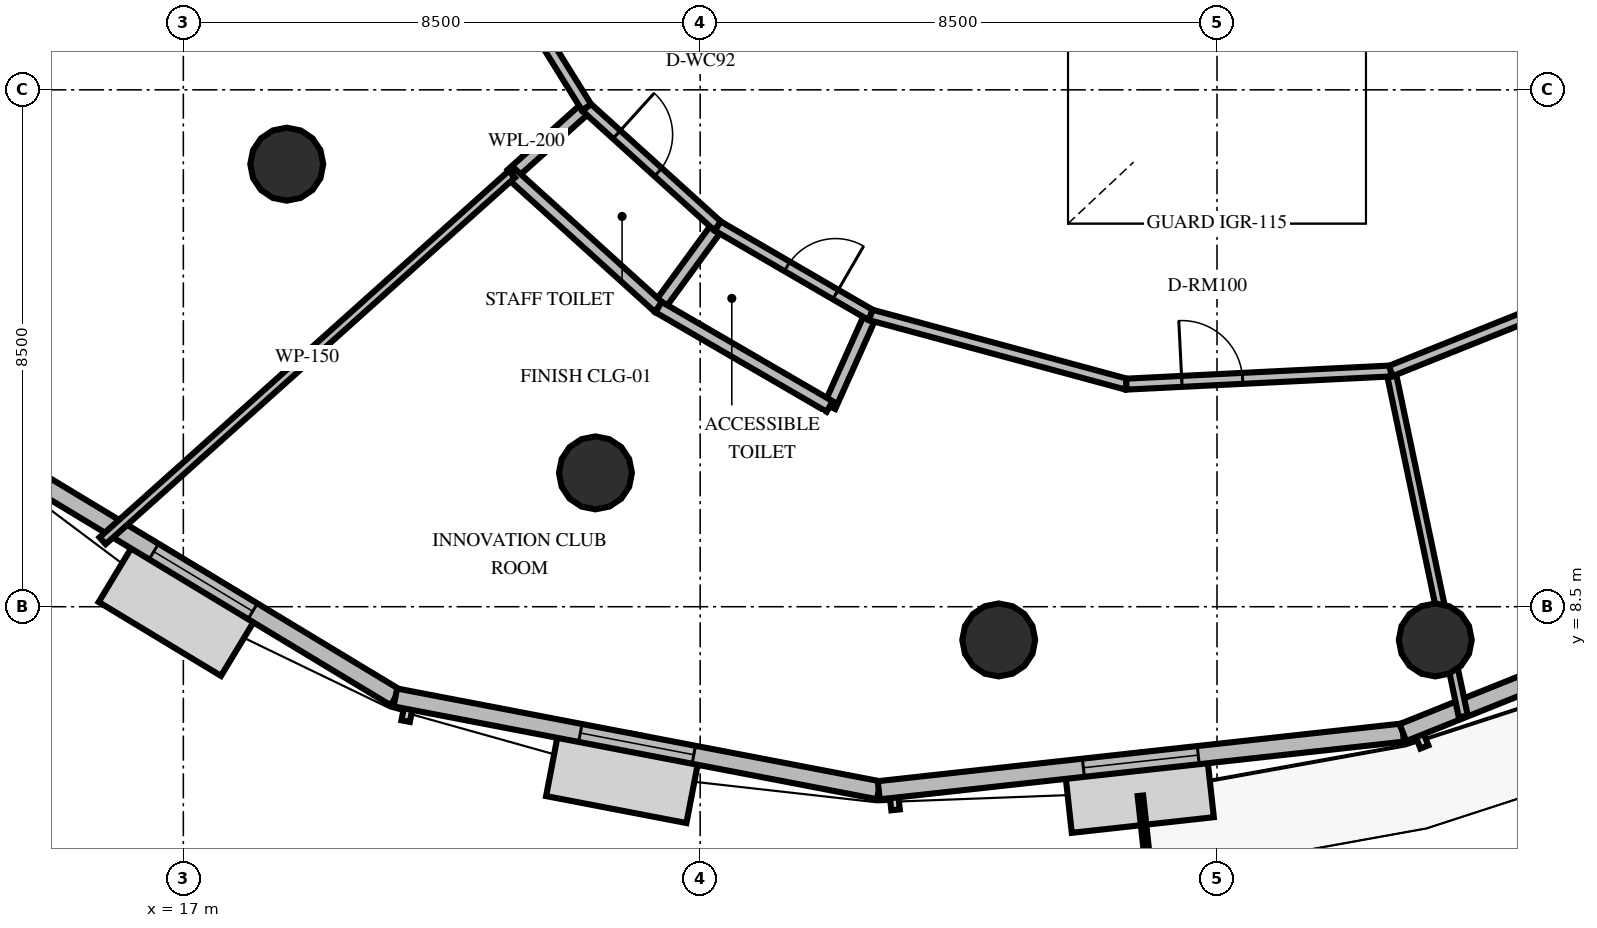
"""IFC4 building model, lengths in metres.
Left out: names, types, materials, properties, quantities, classifications, styles, units other than length and angle.
Written with IfcOpenShell. Run it as: python <this file> out.ifc"""

import sys

from ifc_helpers import new_model, si_unit, direction, frame, frame_2d, origin, origin_2d, place, context, subcontext, project, spatial, rectangle, circle, extrude, element, fill, save


model = new_model("IFC4")
c1 = context("Model", 3, precision=1e-05, world=origin(), true_north=direction((0.0, 1.0)))
c2 = subcontext(c1, "Body", "Model", "MODEL_VIEW")
j1 = project(units=[si_unit("LENGTHUNIT", "METRE"), si_unit("PLANEANGLEUNIT", "RADIAN")], contexts=[c1])
p1 = place(None, origin())
s1 = spatial("IfcSite", under=j1, at=p1, CompositionType="ELEMENT")
p2 = place(p1, origin())
s2 = spatial("IfcBuilding", under=s1, at=p2, CompositionType="ELEMENT")
p3 = place(p2, frame((0.0, 0.0, 125.8)))
s3 = spatial("IfcBuildingStorey", under=s2, at=p3, CompositionType="ELEMENT", Elevation=125.8)
for number, where, z_axis, x_axis in (
    (1, (18.701, 15.778, 0.0), (0.0, 0.0, 1.0), (1.0, 0.0, 0.0)),
    (2, (23.778, 10.701, 0.0), (0.0, 0.0, 1.0), (1.0, 0.0, 0.0)),
    (3, (30.41, 7.954, 0.0), (0.0, 0.0, 1.0), (1.0, 0.0, 0.0)),
    (4, (37.59, 7.954, 0.0), (0.0, 0.0, 1.0), (1.0, 0.0, 0.0)),
):
    element("IfcColumn", number, at=place(p3, frame(where, z_axis=z_axis, x_axis=x_axis)), inside=s3, PredefinedType="COLUMN", context=c2, shape_type="SweptSolid", body=[
        extrude(circle(Radius=0.6, at=origin_2d()), origin(), (0.0, 0.0, 1.0), 4.0),
    ])
p4 = place(p3, frame((14.167, 10.825, 0.0), z_axis=(0.0, 0.0, 1.0), x_axis=(0.856004258132, -0.516968770875, 0.0)))
e5 = element("IfcWall", 5, at=p4, inside=s3, PredefinedType="SOLIDWALL", context=c2, shape_type="SweptSolid", body=[
    extrude(rectangle(XDim=7.383, YDim=0.3, at=frame_2d((3.692, 0.0))), origin(), (0.0, 0.0, 1.0), 2.9),
])
p5 = place(p4, frame((2.742, 0.0, 0.8)))
e6 = element("IfcOpeningElement", 6, at=p5, cuts=e5, PredefinedType="OPENING", context=c2, shape_type="SweptSolid", body=[
    extrude(rectangle(XDim=1.9, YDim=1.95, at=frame_2d((0.95, 0.975))), frame((0.0, 0.16, 0.0), z_axis=(0.0, -1.0, 0.0), x_axis=(1.0, 0.0, 0.0)), (0.0, 0.0, 1.0), 0.32),
])
p6 = place(p3, frame((20.487, 7.008, 0.0), z_axis=(0.0, 0.0, 1.0), x_axis=(0.982062977667, -0.188553196461, 0.0)))
e7 = element("IfcWall", 7, at=p6, inside=s3, PredefinedType="SOLIDWALL", context=c2, shape_type="SweptSolid", body=[
    extrude(rectangle(XDim=8.095, YDim=0.3, at=frame_2d((4.048, 0.0))), origin(), (0.0, 0.0, 1.0), 2.9),
])
p7 = place(p6, frame((3.098, 0.0, 0.8)))
e8 = element("IfcOpeningElement", 8, at=p7, cuts=e7, PredefinedType="OPENING", context=c2, shape_type="SweptSolid", body=[
    extrude(rectangle(XDim=1.9, YDim=1.95, at=frame_2d((0.95, 0.975))), frame((0.0, 0.16, 0.0), z_axis=(0.0, -1.0, 0.0), x_axis=(1.0, 0.0, 0.0)), (0.0, 0.0, 1.0), 0.32),
])
p8 = place(p3, frame((28.437, 5.481, 0.0), z_axis=(0.0, 0.0, 1.0), x_axis=(0.99400193871, 0.109362451697, 0.0)))
e9 = element("IfcWall", 9, at=p8, inside=s3, PredefinedType="SOLIDWALL", context=c2, shape_type="SweptSolid", body=[
    extrude(rectangle(XDim=8.673, YDim=0.3, at=frame_2d((4.336, 0.0))), origin(), (0.0, 0.0, 1.0), 2.9),
])
p9 = place(p8, frame((3.386, 0.0, 0.8)))
e10 = element("IfcOpeningElement", 10, at=p9, cuts=e9, PredefinedType="OPENING", context=c2, shape_type="SweptSolid", body=[
    extrude(rectangle(XDim=1.9, YDim=1.95, at=frame_2d((0.95, 0.975))), frame((0.0, 0.16, 0.0), z_axis=(0.0, -1.0, 0.0), x_axis=(1.0, 0.0, 0.0)), (0.0, 0.0, 1.0), 0.32),
])
p10 = place(p3, frame((37.058, 6.43, 0.0), z_axis=(0.0, 0.0, 1.0), x_axis=(0.928154394982, 0.372195404426, 0.0)))
e11 = element("IfcWall", 11, at=p10, inside=s3, PredefinedType="SOLIDWALL", context=c2, shape_type="SweptSolid", body=[
    extrude(rectangle(XDim=8.891, YDim=0.3, at=frame_2d((4.445, 0.0))), origin(), (0.0, 0.0, 1.0), 2.9),
])
p11 = place(p10, frame((4.11, 0.0, 0.0)))
e12 = element("IfcOpeningElement", 12, at=p11, cuts=e11, PredefinedType="OPENING", context=c2, shape_type="SweptSolid", body=[
    extrude(rectangle(XDim=1.05, YDim=2.15, at=frame_2d((0.525, 1.075))), frame((0.0, 0.16, 0.0), z_axis=(0.0, -1.0, 0.0), x_axis=(1.0, 0.0, 0.0)), (0.0, 0.0, 1.0), 0.32),
])
p12 = place(p3, frame((23.631, 16.713, 0.0), z_axis=(0.0, 0.0, 1.0), x_axis=(-0.744881296244, -0.667197013262, 0.0)))
e13 = element("IfcWall", 13, at=p12, inside=s3, PredefinedType="PLUMBINGWALL", context=c2, shape_type="SweptSolid", body=[
    extrude(rectangle(XDim=1.65, YDim=0.2, at=frame_2d((0.825, 0.0))), origin(), (0.0, 0.0, 1.0), 2.8),
])
p13 = place(p3, frame((25.789, 14.76, 0.0), z_axis=(0.0, 0.0, 1.0), x_axis=(-0.58986820349, -0.807499537158, 0.0)))
e14 = element("IfcWall", 14, at=p13, inside=s3, PredefinedType="PLUMBINGWALL", context=c2, shape_type="SweptSolid", body=[
    extrude(rectangle(XDim=1.65, YDim=0.2, at=frame_2d((0.825, 0.0))), origin(), (0.0, 0.0, 1.0), 2.8),
])
p14 = place(p3, frame((22.402, 15.612, 0.0), z_axis=(0.0, 0.0, 1.0), x_axis=(0.741336734145, -0.671133255477, 0.0)))
e15 = element("IfcWall", 15, at=p14, inside=s3, PredefinedType="PLUMBINGWALL", context=c2, shape_type="SweptSolid", body=[
    extrude(rectangle(XDim=3.255, YDim=0.2, at=frame_2d((1.627, 0.0))), origin(), (0.0, 0.0, 1.0), 2.8),
])
p15 = place(p3, frame((23.631, 16.713, 0.0), z_axis=(0.0, 0.0, 1.0), x_axis=(0.741384706551, -0.671080261141, 0.0)))
e16 = element("IfcWall", 16, at=p15, inside=s3, PredefinedType="PARTITIONING", context=c2, shape_type="SweptSolid", body=[
    extrude(rectangle(XDim=2.91, YDim=0.18, at=frame_2d((1.455, 0.0))), origin(), (0.0, 0.0, 1.0), 2.8),
])
p16 = place(p15, frame((0.669, 0.0, 0.0)))
e17 = element("IfcOpeningElement", 17, at=p16, cuts=e16, PredefinedType="OPENING", context=c2, shape_type="SweptSolid", body=[
    extrude(rectangle(XDim=0.92, YDim=2.1, at=frame_2d((0.46, 1.05))), frame((0.0, 0.1, 0.0), z_axis=(0.0, -1.0, 0.0), x_axis=(1.0, 0.0, 0.0)), (0.0, 0.0, 1.0), 0.2),
])
p17 = place(p3, frame((28.305, 13.298, 0.0), z_axis=(0.0, 0.0, 1.0), x_axis=(-0.409115381084, -0.912482660088, 0.0)))
e18 = element("IfcWall", 18, at=p17, inside=s3, PredefinedType="PLUMBINGWALL", context=c2, shape_type="SweptSolid", body=[
    extrude(rectangle(XDim=1.65, YDim=0.2, at=frame_2d((0.825, 0.0))), origin(), (0.0, 0.0, 1.0), 2.8),
])
p18 = place(p3, frame((24.815, 13.427, 0.0), z_axis=(0.0, 0.0, 1.0), x_axis=(0.864732205819, -0.502233224925, 0.0)))
e19 = element("IfcWall", 19, at=p18, inside=s3, PredefinedType="PLUMBINGWALL", context=c2, shape_type="SweptSolid", body=[
    extrude(rectangle(XDim=3.255, YDim=0.2, at=frame_2d((1.627, 0.0))), origin(), (0.0, 0.0, 1.0), 2.8),
])
p19 = place(p3, frame((25.789, 14.76, 0.0), z_axis=(0.0, 0.0, 1.0), x_axis=(0.864705496713, -0.502279209161, 0.0)))
e20 = element("IfcWall", 20, at=p19, inside=s3, PredefinedType="PARTITIONING", context=c2, shape_type="SweptSolid", body=[
    extrude(rectangle(XDim=2.91, YDim=0.18, at=frame_2d((1.455, 0.0))), origin(), (0.0, 0.0, 1.0), 2.8),
])
p20 = place(p19, frame((1.321, 0.0, 0.0)))
e21 = element("IfcOpeningElement", 21, at=p20, cuts=e20, PredefinedType="OPENING", context=c2, shape_type="SweptSolid", body=[
    extrude(rectangle(XDim=0.92, YDim=2.1, at=frame_2d((0.46, 1.05))), frame((0.0, 0.1, 0.0), z_axis=(0.0, -1.0, 0.0), x_axis=(1.0, 0.0, 0.0)), (0.0, 0.0, 1.0), 0.2),
])
p21 = place(p3, frame((22.402, 15.612, 0.0), z_axis=(0.0, 0.0, 1.0), x_axis=(-0.744885698321, -0.667192098602, 0.0)))
e22 = element("IfcWall", 22, at=p21, inside=s3, PredefinedType="PARTITIONING", context=c2, shape_type="SweptSolid", body=[
    extrude(rectangle(XDim=9.034, YDim=0.15, at=frame_2d((4.517, 0.0))), origin(), (0.0, 0.0, 1.0), 2.8),
])
p22 = place(p3, frame((36.858, 12.377, 0.0), z_axis=(0.0, 0.0, 1.0), x_axis=(0.205378628845, -0.978682593497, 0.0)))
e23 = element("IfcWall", 23, at=p22, inside=s3, PredefinedType="PARTITIONING", context=c2, shape_type="SweptSolid", body=[
    extrude(rectangle(XDim=5.803, YDim=0.15, at=frame_2d((2.902, 0.0))), origin(), (0.0, 0.0, 1.0), 2.8),
])
p23 = place(p3, frame((28.305, 13.298, 0.0), z_axis=(0.0, 0.0, 1.0), x_axis=(0.965247291072, -0.261338223531, 0.0)))
e24 = element("IfcWall", 24, at=p23, inside=s3, PredefinedType="PARTITIONING", context=c2, shape_type="SweptSolid", body=[
    extrude(rectangle(XDim=4.355, YDim=0.18, at=frame_2d((2.178, 0.0))), origin(), (0.0, 0.0, 1.0), 2.8),
])
p24 = place(p3, frame((32.509, 12.16, 0.0), z_axis=(0.0, 0.0, 1.0), x_axis=(0.998762941089, 0.049725119485, 0.0)))
e25 = element("IfcWall", 25, at=p24, inside=s3, PredefinedType="PARTITIONING", context=c2, shape_type="SweptSolid", body=[
    extrude(rectangle(XDim=4.355, YDim=0.18, at=frame_2d((2.177, 0.0))), origin(), (0.0, 0.0, 1.0), 2.8),
])
p25 = place(p24, frame((0.914, 0.0, 0.0)))
e26 = element("IfcOpeningElement", 26, at=p25, cuts=e25, PredefinedType="OPENING", context=c2, shape_type="SweptSolid", body=[
    extrude(rectangle(XDim=1.0, YDim=2.15, at=frame_2d((0.5, 1.075))), frame((0.0, 0.1, 0.0), z_axis=(0.0, -1.0, 0.0), x_axis=(1.0, 0.0, 0.0)), (0.0, 0.0, 1.0), 0.2),
])
p26 = place(p3, frame((36.858, 12.377, 0.0), z_axis=(0.0, 0.0, 1.0), x_axis=(0.928173370801, 0.372148080387, 0.0)))
e27 = element("IfcWall", 27, at=p26, inside=s3, PredefinedType="PARTITIONING", context=c2, shape_type="SweptSolid", body=[
    extrude(rectangle(XDim=4.834, YDim=0.18, at=frame_2d((2.417, 0.0))), origin(), (0.0, 0.0, 1.0), 2.8),
])
p27 = place(p3, frame((21.08, 20.819, 0.0), z_axis=(0.0, 0.0, 1.0), x_axis=(0.527690930955, -0.849436449293, 0.0)))
e28 = element("IfcWall", 28, at=p27, inside=s3, PredefinedType="PARTITIONING", context=c2, shape_type="SweptSolid", body=[
    extrude(rectangle(XDim=4.834, YDim=0.18, at=frame_2d((2.417, 0.0))), origin(), (0.0, 0.0, 1.0), 2.8),
])
p28 = place(p27, frame((1.034, 0.0, 0.0)))
e29 = element("IfcOpeningElement", 29, at=p28, cuts=e28, PredefinedType="OPENING", context=c2, shape_type="SweptSolid", body=[
    extrude(rectangle(XDim=1.0, YDim=2.15, at=frame_2d((0.5, 1.075))), frame((0.0, 0.1, 0.0), z_axis=(0.0, -1.0, 0.0), x_axis=(1.0, 0.0, 0.0)), (0.0, 0.0, 1.0), 0.2),
])
p29 = place(p5, origin())
e30 = element("IfcWindow", 30, at=p29, inside=s3, PartitioningType="SINGLE_PANEL", PredefinedType="WINDOW", context=c2, shape_type="SweptSolid", body=[
    extrude(rectangle(XDim=1.9, YDim=1.95, at=frame_2d((0.95, 0.975))), frame((0.0, 0.03, 0.0), z_axis=(0.0, -1.0, 0.0), x_axis=(1.0, 0.0, 0.0)), (0.0, 0.0, 1.0), 0.06),
])
fill(e6, e30)
p30 = place(p7, origin())
e31 = element("IfcWindow", 31, at=p30, inside=s3, PartitioningType="SINGLE_PANEL", PredefinedType="WINDOW", context=c2, shape_type="SweptSolid", body=[
    extrude(rectangle(XDim=1.9, YDim=1.95, at=frame_2d((0.95, 0.975))), frame((0.0, 0.03, 0.0), z_axis=(0.0, -1.0, 0.0), x_axis=(1.0, 0.0, 0.0)), (0.0, 0.0, 1.0), 0.06),
])
fill(e8, e31)
p31 = place(p9, origin())
e32 = element("IfcWindow", 32, at=p31, inside=s3, PartitioningType="SINGLE_PANEL", PredefinedType="WINDOW", context=c2, shape_type="SweptSolid", body=[
    extrude(rectangle(XDim=1.9, YDim=1.95, at=frame_2d((0.95, 0.975))), frame((0.0, 0.03, 0.0), z_axis=(0.0, -1.0, 0.0), x_axis=(1.0, 0.0, 0.0)), (0.0, 0.0, 1.0), 0.06),
])
fill(e10, e32)
p32 = place(p16, origin())
e33 = element("IfcDoor", 33, at=p32, inside=s3, OperationType="SINGLE_SWING_LEFT", PredefinedType="DOOR", context=c2, shape_type="SweptSolid", body=[
    extrude(rectangle(XDim=0.92, YDim=2.1, at=frame_2d((0.46, 1.05))), frame((0.0, 0.025, 0.0), z_axis=(0.0, -1.0, 0.0), x_axis=(1.0, 0.0, 0.0)), (0.0, 0.0, 1.0), 0.05),
])
fill(e17, e33)
p33 = place(p20, origin())
e34 = element("IfcDoor", 34, at=p33, inside=s3, OperationType="SINGLE_SWING_RIGHT", PredefinedType="DOOR", context=c2, shape_type="SweptSolid", body=[
    extrude(rectangle(XDim=0.92, YDim=2.1, at=frame_2d((0.46, 1.05))), frame((0.0, 0.025, 0.0), z_axis=(0.0, -1.0, 0.0), x_axis=(1.0, 0.0, 0.0)), (0.0, 0.0, 1.0), 0.05),
])
fill(e21, e34)
p34 = place(p25, origin())
e35 = element("IfcDoor", 35, at=p34, inside=s3, OperationType="SINGLE_SWING_LEFT", PredefinedType="DOOR", context=c2, shape_type="SweptSolid", body=[
    extrude(rectangle(XDim=1.0, YDim=2.15, at=frame_2d((0.5, 1.075))), frame((0.0, 0.025, 0.0), z_axis=(0.0, -1.0, 0.0), x_axis=(1.0, 0.0, 0.0)), (0.0, 0.0, 1.0), 0.05),
])
fill(e26, e35)
save(model, sys.argv[1])
